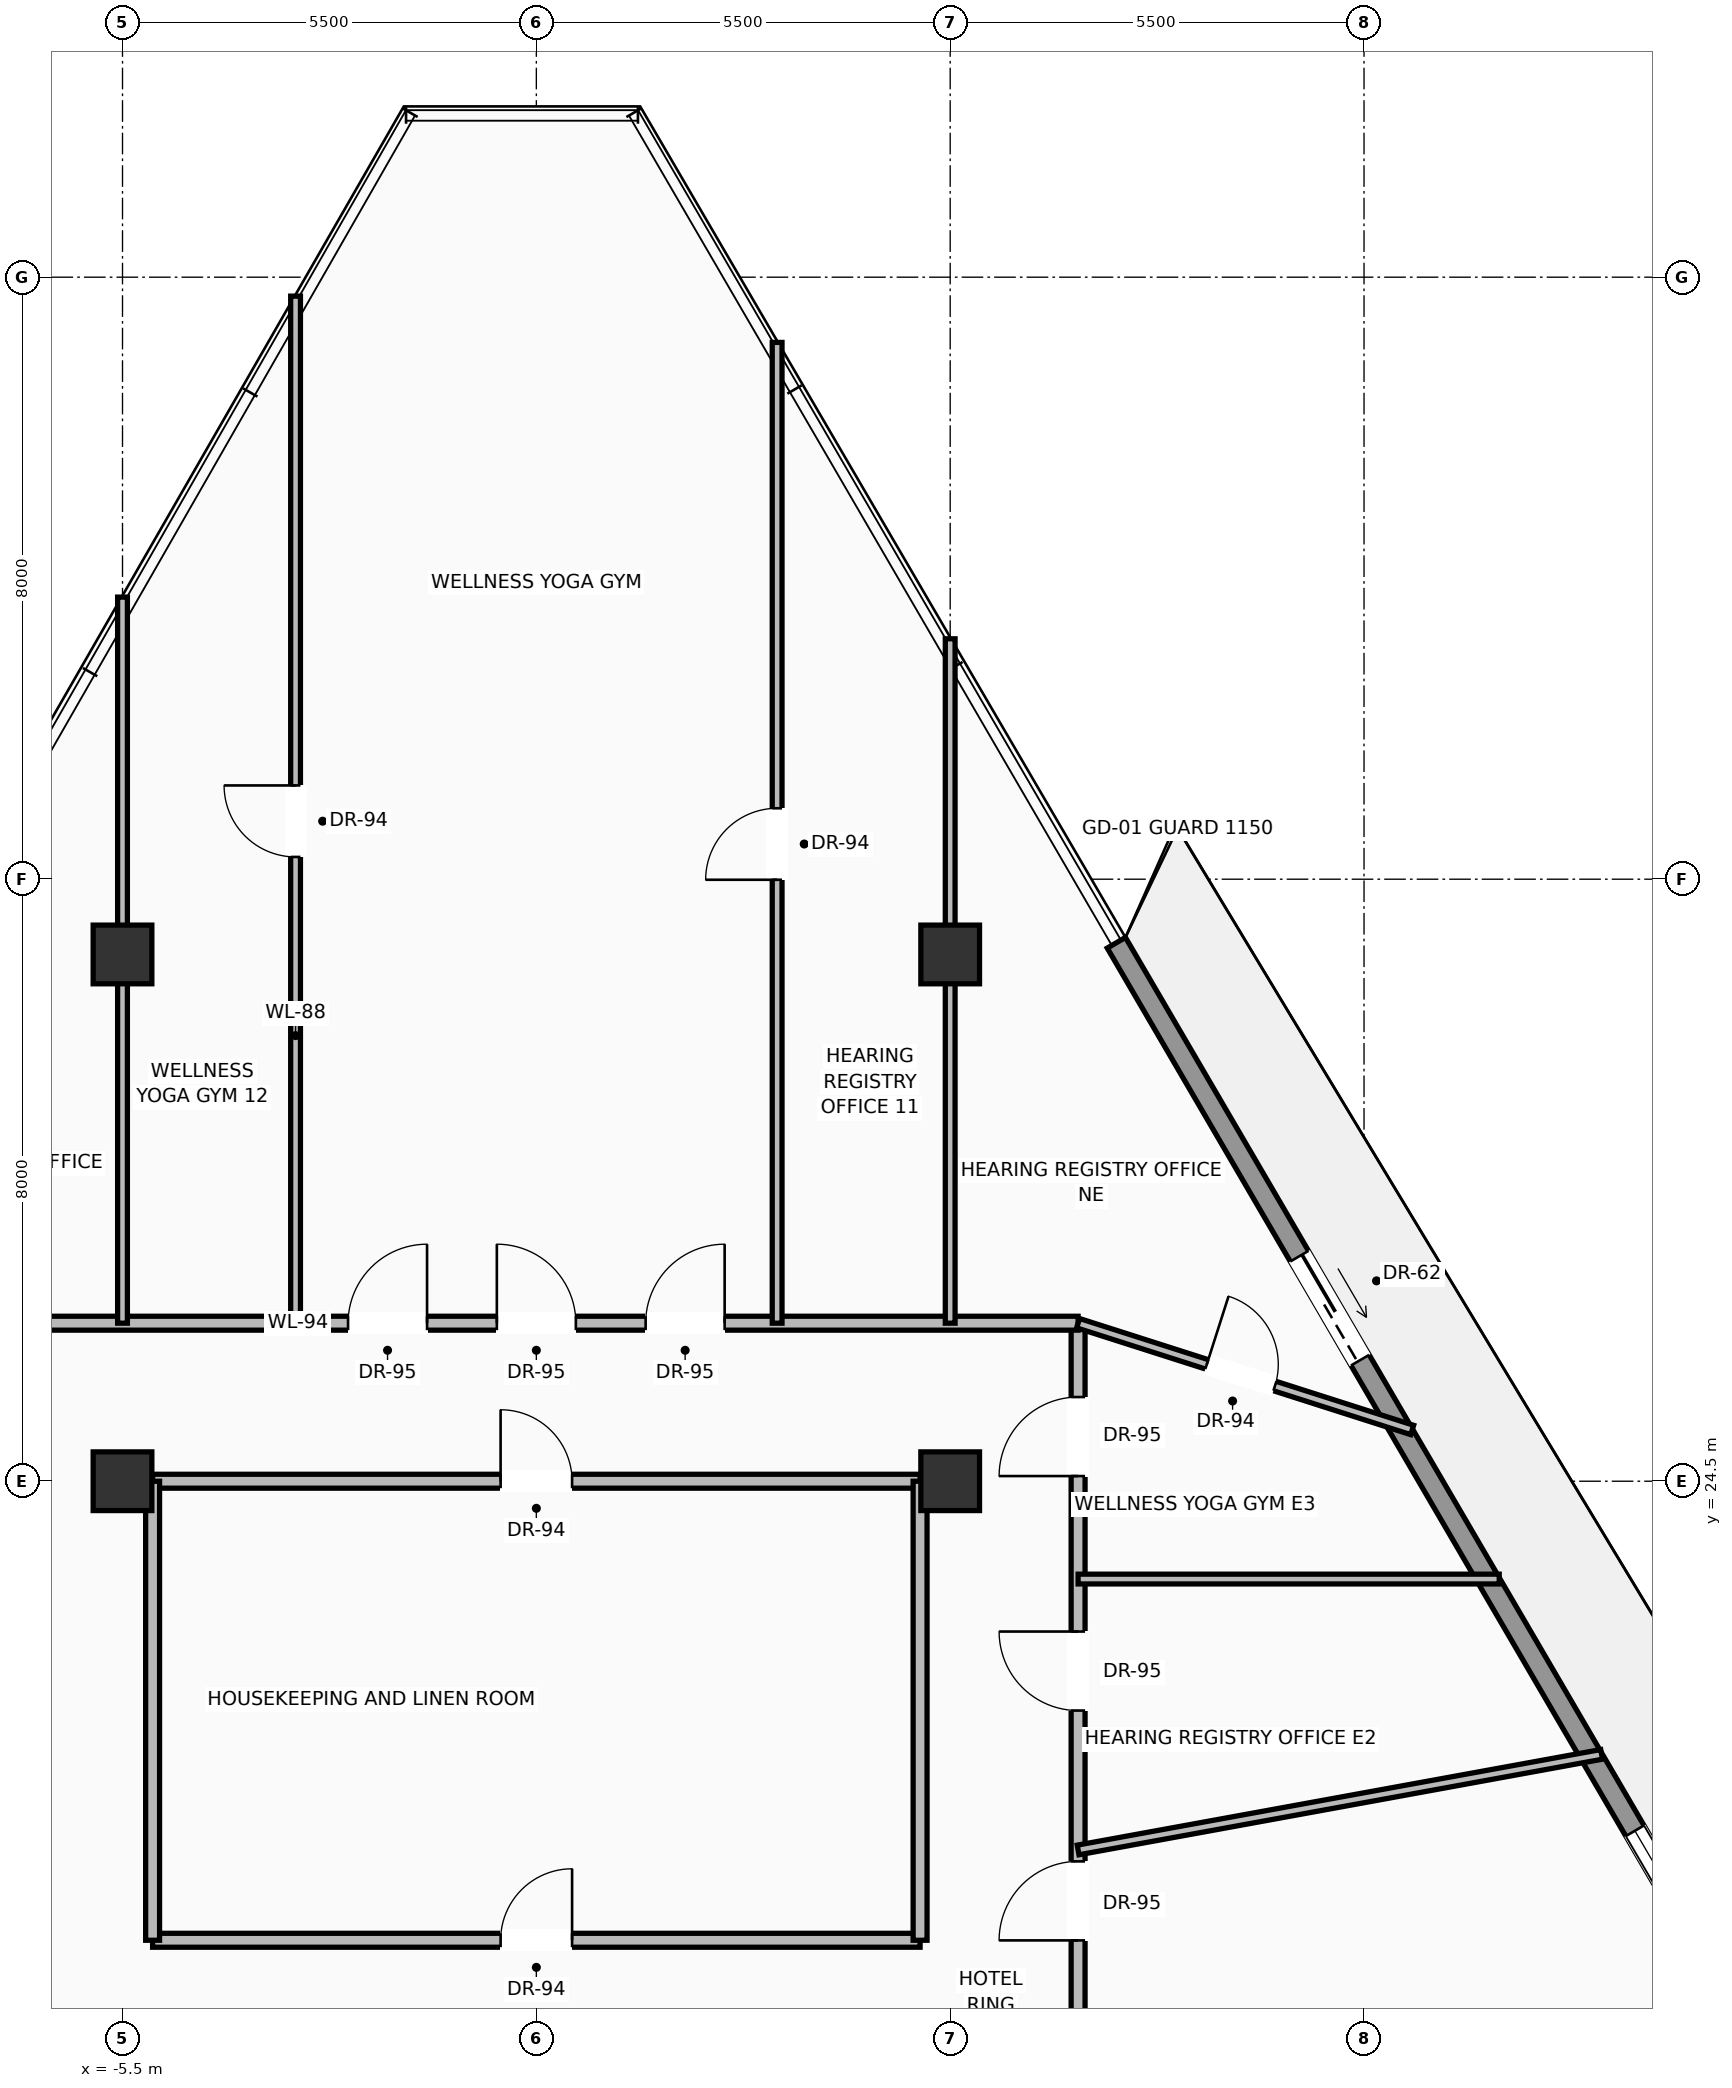
"""IFC4 building model, lengths in metres.
Left out: names, types, materials, properties, quantities, classifications, styles, units other than length and angle.
Written with IfcOpenShell. Run it as: python <this file> out.ifc"""

import sys

from ifc_helpers import new_model, si_unit, direction, frame, frame_2d, origin, origin_2d, place, context, subcontext, project, spatial, rectangle, extrude, source, transform, mapped, element, fill, save


model = new_model("IFC4")
c1 = context("Model", 3, precision=1e-05, world=origin(), true_north=direction((0.0, 1.0)))
c2 = subcontext(c1, "Body", "Model", "MODEL_VIEW")
j1 = project(units=[si_unit("LENGTHUNIT", "METRE"), si_unit("PLANEANGLEUNIT", "RADIAN")], contexts=[c1])
p1 = place(None, origin())
s1 = spatial("IfcSite", under=j1, at=p1, CompositionType="ELEMENT")
p2 = place(p1, origin())
s2 = spatial("IfcBuilding", under=s1, at=p2, CompositionType="ELEMENT")
p3 = place(p2, frame((0.0, 0.0, 286.8)))
s3 = spatial("IfcBuildingStorey", under=s2, at=p3, CompositionType="ELEMENT", Elevation=286.8)
m1 = source(origin(), c2, "Body", "SweptSolid", [
    extrude(rectangle(XDim=0.78, YDim=0.78, at=origin_2d()), origin(), (0.0, 0.0, 1.0), 3.45),
])
for number, where, z_axis, x_axis in (
    (1, (-5.5, 24.5, 0.0), (0.0, 0.0, 1.0), (1.0, 0.0, 0.0)),
    (2, (5.5, 24.5, 0.0), (0.0, 0.0, 1.0), (1.0, 0.0, 0.0)),
    (3, (-5.5, 31.5, 0.0), (0.0, 0.0, 1.0), (1.0, 0.0, 0.0)),
    (4, (5.5, 31.5, 0.0), (0.0, 0.0, 1.0), (1.0, 0.0, 0.0)),
):
    element("IfcColumn", number, at=place(p3, frame(where, z_axis=z_axis, x_axis=x_axis)), inside=s3, PredefinedType="COLUMN", context=c2, shape_type="MappedRepresentation", body=[
        mapped(m1, transform((0.0, 0.0, 0.0), scale=1.0)),
    ])
p4 = place(p3, frame((7.708, 31.656, 0.0), z_axis=(0.0, 0.0, 1.0), x_axis=(0.504292445958, -0.86353293449, 0.0)))
e5 = element("IfcWall", 5, at=p4, inside=s3, PredefinedType="SOLIDWALL", context=c2, shape_type="SweptSolid", body=[
    extrude(rectangle(XDim=20.096, YDim=0.28, at=frame_2d((10.048, 0.0))), origin(), (0.0, 0.0, 1.0), 2.82),
])
p5 = place(p4, frame((4.823, 0.0, 0.0)))
e6 = element("IfcOpeningElement", 6, at=p5, cuts=e5, PredefinedType="OPENING", context=c2, shape_type="SweptSolid", body=[
    extrude(rectangle(XDim=1.6, YDim=2.35, at=frame_2d((0.8, 1.175))), frame((0.0, 0.15, 0.0), z_axis=(0.0, -1.0, 0.0), x_axis=(1.0, 0.0, 0.0)), (0.0, 0.0, 1.0), 0.3),
])
p6 = place(p4, frame((13.666, 0.0, 0.9)))
e7 = element("IfcOpeningElement", 7, at=p6, cuts=e5, PredefinedType="OPENING", context=c2, shape_type="SweptSolid", body=[
    extrude(rectangle(XDim=1.55, YDim=1.75, at=frame_2d((0.775, 0.875))), frame((0.0, 0.15, 0.0), z_axis=(0.0, -1.0, 0.0), x_axis=(1.0, 0.0, 0.0)), (0.0, 0.0, 1.0), 0.3),
])
p7 = place(p3, frame((-5.1, 18.4, 0.0), z_axis=(0.0, 0.0, 1.0), x_axis=(1.0, 0.0, 0.0)))
e8 = element("IfcWall", 8, at=p7, inside=s3, PredefinedType="PARTITIONING", context=c2, shape_type="SweptSolid", body=[
    extrude(rectangle(XDim=10.2, YDim=0.185, at=frame_2d((5.1, 0.0))), origin(), (0.0, 0.0, 1.0), 3.232),
])
p8 = place(p7, frame((4.625, 0.0, 0.0)))
e9 = element("IfcOpeningElement", 9, at=p8, cuts=e8, PredefinedType="OPENING", context=c2, shape_type="SweptSolid", body=[
    extrude(rectangle(XDim=0.95, YDim=2.2, at=frame_2d((0.475, 1.1))), frame((0.0, 0.103, 0.0), z_axis=(0.0, -1.0, 0.0), x_axis=(1.0, 0.0, 0.0)), (0.0, 0.0, 1.0), 0.205),
])
p9 = place(p3, frame((-5.1, 24.5, 0.0), z_axis=(0.0, 0.0, 1.0), x_axis=(1.0, 0.0, 0.0)))
e10 = element("IfcWall", 10, at=p9, inside=s3, PredefinedType="PARTITIONING", context=c2, shape_type="SweptSolid", body=[
    extrude(rectangle(XDim=10.2, YDim=0.185, at=frame_2d((5.1, 0.0))), origin(), (0.0, 0.0, 1.0), 2.683),
])
p10 = place(p9, frame((4.625, 0.0, 0.0)))
e11 = element("IfcOpeningElement", 11, at=p10, cuts=e10, PredefinedType="OPENING", context=c2, shape_type="SweptSolid", body=[
    extrude(rectangle(XDim=0.95, YDim=2.2, at=frame_2d((0.475, 1.1))), frame((0.0, 0.103, 0.0), z_axis=(0.0, -1.0, 0.0), x_axis=(1.0, 0.0, 0.0)), (0.0, 0.0, 1.0), 0.205),
])
for number, where, z_axis, x_axis in (
    (12, (-5.1, 18.4, 0.0), (0.0, 0.0, 1.0), (0.0, 1.0, 0.0)),
    (13, (5.1, 18.4, 0.0), (0.0, 0.0, 1.0), (0.0, 1.0, 0.0)),
):
    element("IfcWall", number, at=place(p3, frame(where, z_axis=z_axis, x_axis=x_axis)), inside=s3, PredefinedType="PARTITIONING", context=c2, shape_type="SweptSolid", body=[
        extrude(rectangle(XDim=6.1, YDim=0.185, at=frame_2d((3.05, 0.0))), origin(), (0.0, 0.0, 1.0), 3.232),
    ])
p11 = place(p3, frame((7.2, 16.2, 0.0), z_axis=(0.0, 0.0, 1.0), x_axis=(0.0, 1.0, 0.0)))
e14 = element("IfcWall", 14, at=p11, inside=s3, PredefinedType="PARTITIONING", context=c2, shape_type="SweptSolid", body=[
    extrude(rectangle(XDim=10.4, YDim=0.185, at=frame_2d((5.2, 0.0))), origin(), (0.0, 0.0, 1.0), 3.232),
])
p12 = place(p11, frame((2.198, 0.0, 0.0)))
e15 = element("IfcOpeningElement", 15, at=p12, cuts=e14, PredefinedType="OPENING", context=c2, shape_type="SweptSolid", body=[
    extrude(rectangle(XDim=1.05, YDim=2.25, at=frame_2d((0.525, 1.125))), frame((0.0, 0.103, 0.0), z_axis=(0.0, -1.0, 0.0), x_axis=(1.0, 0.0, 0.0)), (0.0, 0.0, 1.0), 0.205),
])
p13 = place(p11, frame((5.252, 0.0, 0.0)))
e16 = element("IfcOpeningElement", 16, at=p13, cuts=e14, PredefinedType="OPENING", context=c2, shape_type="SweptSolid", body=[
    extrude(rectangle(XDim=1.05, YDim=2.25, at=frame_2d((0.525, 1.125))), frame((0.0, 0.103, 0.0), z_axis=(0.0, -1.0, 0.0), x_axis=(1.0, 0.0, 0.0)), (0.0, 0.0, 1.0), 0.205),
])
p14 = place(p11, frame((8.369, 0.0, 0.0)))
e17 = element("IfcOpeningElement", 17, at=p14, cuts=e14, PredefinedType="OPENING", context=c2, shape_type="SweptSolid", body=[
    extrude(rectangle(XDim=1.05, YDim=2.25, at=frame_2d((0.525, 1.125))), frame((0.0, 0.103, 0.0), z_axis=(0.0, -1.0, 0.0), x_axis=(1.0, 0.0, 0.0)), (0.0, 0.0, 1.0), 0.205),
])
p15 = place(p3, frame((-7.2, 26.6, 0.0), z_axis=(0.0, 0.0, 1.0), x_axis=(1.0, 0.0, 0.0)))
e18 = element("IfcWall", 18, at=p15, inside=s3, PredefinedType="PARTITIONING", context=c2, shape_type="SweptSolid", body=[
    extrude(rectangle(XDim=14.4, YDim=0.185, at=frame_2d((7.2, 0.0))), origin(), (0.0, 0.0, 1.0), 3.232),
])
p16 = place(p15, frame((4.698, 0.0, 0.0)))
e19 = element("IfcOpeningElement", 19, at=p16, cuts=e18, PredefinedType="OPENING", context=c2, shape_type="SweptSolid", body=[
    extrude(rectangle(XDim=1.05, YDim=2.25, at=frame_2d((0.525, 1.125))), frame((0.0, 0.103, 0.0), z_axis=(0.0, -1.0, 0.0), x_axis=(1.0, 0.0, 0.0)), (0.0, 0.0, 1.0), 0.205),
])
p17 = place(p15, frame((6.675, 0.0, 0.0)))
e20 = element("IfcOpeningElement", 20, at=p17, cuts=e18, PredefinedType="OPENING", context=c2, shape_type="SweptSolid", body=[
    extrude(rectangle(XDim=1.05, YDim=2.25, at=frame_2d((0.525, 1.125))), frame((0.0, 0.103, 0.0), z_axis=(0.0, -1.0, 0.0), x_axis=(1.0, 0.0, 0.0)), (0.0, 0.0, 1.0), 0.205),
])
p18 = place(p15, frame((8.653, 0.0, 0.0)))
e21 = element("IfcOpeningElement", 21, at=p18, cuts=e18, PredefinedType="OPENING", context=c2, shape_type="SweptSolid", body=[
    extrude(rectangle(XDim=1.05, YDim=2.25, at=frame_2d((0.525, 1.125))), frame((0.0, 0.103, 0.0), z_axis=(0.0, -1.0, 0.0), x_axis=(1.0, 0.0, 0.0)), (0.0, 0.0, 1.0), 0.205),
])
p19 = place(p3, frame((7.2, 26.6, 0.0), z_axis=(0.0, 0.0, 1.0), x_axis=(0.952553600786, -0.304370888275, 0.0)))
e22 = element("IfcWall", 22, at=p19, inside=s3, PredefinedType="PARTITIONING", context=c2, shape_type="SweptSolid", body=[
    extrude(rectangle(XDim=4.661, YDim=0.13, at=frame_2d((2.331, 0.0))), origin(), (0.0, 0.0, 1.0), 3.232),
])
p20 = place(p19, frame((1.796, 0.0, 0.0)))
e23 = element("IfcOpeningElement", 23, at=p20, cuts=e22, PredefinedType="OPENING", context=c2, shape_type="SweptSolid", body=[
    extrude(rectangle(XDim=0.95, YDim=2.2, at=frame_2d((0.475, 1.1))), frame((0.0, 0.075, 0.0), z_axis=(0.0, -1.0, 0.0), x_axis=(1.0, 0.0, 0.0)), (0.0, 0.0, 1.0), 0.15),
])
p21 = place(p3, frame((-5.5, 26.6, 0.0), z_axis=(0.0, 0.0, 1.0), x_axis=(0.0, 1.0, 0.0)))
e24 = element("IfcWall", 24, at=p21, inside=s3, PredefinedType="PARTITIONING", context=c2, shape_type="SweptSolid", body=[
    extrude(rectangle(XDim=9.649, YDim=0.13, at=frame_2d((4.824, 0.0))), origin(), (0.0, 0.0, 1.0), 2.683),
])
p22 = place(p3, frame((5.5, 26.6, 0.0), z_axis=(0.0, 0.0, 1.0), x_axis=(0.0, 1.0, 0.0)))
e25 = element("IfcWall", 25, at=p22, inside=s3, PredefinedType="PARTITIONING", context=c2, shape_type="SweptSolid", body=[
    extrude(rectangle(XDim=9.095, YDim=0.13, at=frame_2d((4.547, 0.0))), origin(), (0.0, 0.0, 1.0), 2.683),
])
p23 = place(p3, frame((-3.2, 26.6, 0.0), z_axis=(0.0, 0.0, 1.0), x_axis=(0.0, 1.0, 0.0)))
e26 = element("IfcWall", 26, at=p23, inside=s3, PredefinedType="PARTITIONING", context=c2, shape_type="SweptSolid", body=[
    extrude(rectangle(XDim=13.648, YDim=0.13, at=frame_2d((6.824, 0.0))), origin(), (0.0, 0.0, 1.0), 3.232),
])
p24 = place(p23, frame((6.196, 0.0, 0.0)))
e27 = element("IfcOpeningElement", 27, at=p24, cuts=e26, PredefinedType="OPENING", context=c2, shape_type="SweptSolid", body=[
    extrude(rectangle(XDim=0.95, YDim=2.2, at=frame_2d((0.475, 1.1))), frame((0.0, 0.075, 0.0), z_axis=(0.0, -1.0, 0.0), x_axis=(1.0, 0.0, 0.0)), (0.0, 0.0, 1.0), 0.15),
])
p25 = place(p3, frame((3.2, 26.6, 0.0), z_axis=(0.0, 0.0, 1.0), x_axis=(0.0, 1.0, 0.0)))
e28 = element("IfcWall", 28, at=p25, inside=s3, PredefinedType="PARTITIONING", context=c2, shape_type="SweptSolid", body=[
    extrude(rectangle(XDim=13.033, YDim=0.13, at=frame_2d((6.517, 0.0))), origin(), (0.0, 0.0, 1.0), 3.232),
])
p26 = place(p25, frame((5.893, 0.0, 0.0)))
e29 = element("IfcOpeningElement", 29, at=p26, cuts=e28, PredefinedType="OPENING", context=c2, shape_type="SweptSolid", body=[
    extrude(rectangle(XDim=0.95, YDim=2.2, at=frame_2d((0.475, 1.1))), frame((0.0, 0.075, 0.0), z_axis=(0.0, -1.0, 0.0), x_axis=(1.0, 0.0, 0.0)), (0.0, 0.0, 1.0), 0.15),
])
p27 = place(p3, frame((7.2, 19.6, 0.0), z_axis=(0.0, 0.0, 1.0), x_axis=(0.983744847031, 0.179571924144, 0.0)))
e30 = element("IfcWall", 30, at=p27, inside=s3, PredefinedType="PARTITIONING", context=c2, shape_type="SweptSolid", body=[
    extrude(rectangle(XDim=7.073, YDim=0.13, at=frame_2d((3.536, 0.0))), origin(), (0.0, 0.0, 1.0), 2.885),
])
p28 = place(p3, frame((7.2, 23.2, 0.0), z_axis=(0.0, 0.0, 1.0), x_axis=(1.0, 0.0, 0.0)))
e31 = element("IfcWall", 31, at=p28, inside=s3, PredefinedType="PARTITIONING", context=c2, shape_type="SweptSolid", body=[
    extrude(rectangle(XDim=5.597, YDim=0.13, at=frame_2d((2.798, 0.0))), origin(), (0.0, 0.0, 1.0), 3.232),
])
m2 = source(origin(), c2, "Body", "SweptSolid", [
    extrude(rectangle(XDim=1.6, YDim=2.35, at=frame_2d((0.8, 1.175))), frame((0.0, 0.025, 0.0), z_axis=(0.0, -1.0, 0.0), x_axis=(1.0, 0.0, 0.0)), (0.0, 0.0, 1.0), 0.05),
])
p29 = place(p5, origin())
e32 = element("IfcDoor", 32, at=p29, inside=s3, OperationType="SLIDING_TO_RIGHT", PredefinedType="DOOR", context=c2, shape_type="MappedRepresentation", body=[
    mapped(m2, transform((0.0, 0.0, 0.0), scale=1.0)),
])
fill(e6, e32)
m3 = source(origin(), c2, "Body", "SweptSolid", [
    extrude(rectangle(XDim=1.55, YDim=1.75, at=frame_2d((0.775, 0.875))), frame((0.0, 0.03, 0.0), z_axis=(0.0, -1.0, 0.0), x_axis=(1.0, 0.0, 0.0)), (0.0, 0.0, 1.0), 0.06),
])
p30 = place(p6, origin())
e33 = element("IfcWindow", 33, at=p30, inside=s3, PartitioningType="SINGLE_PANEL", PredefinedType="WINDOW", context=c2, shape_type="MappedRepresentation", body=[
    mapped(m3, transform((0.0, 0.0, 0.0), scale=1.0)),
])
fill(e7, e33)
m4 = source(origin(), c2, "Body", "SweptSolid", [
    extrude(rectangle(XDim=0.95, YDim=2.2, at=frame_2d((0.475, 1.1))), frame((0.0, 0.025, 0.0), z_axis=(0.0, -1.0, 0.0), x_axis=(1.0, 0.0, 0.0)), (0.0, 0.0, 1.0), 0.05),
])
p31 = place(p8, origin())
e34 = element("IfcDoor", 34, at=p31, inside=s3, OperationType="SINGLE_SWING_RIGHT", PredefinedType="DOOR", context=c2, shape_type="MappedRepresentation", body=[
    mapped(m4, transform((0.0, 0.0, 0.0), scale=1.0)),
])
fill(e9, e34)
p32 = place(p10, origin())
e35 = element("IfcDoor", 35, at=p32, inside=s3, OperationType="SINGLE_SWING_LEFT", PredefinedType="DOOR", context=c2, shape_type="MappedRepresentation", body=[
    mapped(m4, transform((0.0, 0.0, 0.0), scale=1.0)),
])
fill(e11, e35)
m5 = source(origin(), c2, "Body", "SweptSolid", [
    extrude(rectangle(XDim=1.05, YDim=2.25, at=frame_2d((0.525, 1.125))), frame((0.0, 0.025, 0.0), z_axis=(0.0, -1.0, 0.0), x_axis=(1.0, 0.0, 0.0)), (0.0, 0.0, 1.0), 0.05),
])
p33 = place(p12, origin())
e36 = element("IfcDoor", 36, at=p33, inside=s3, OperationType="SINGLE_SWING_LEFT", PredefinedType="DOOR", context=c2, shape_type="MappedRepresentation", body=[
    mapped(m5, transform((0.0, 0.0, 0.0), scale=1.0)),
])
fill(e15, e36)
p34 = place(p13, origin())
e37 = element("IfcDoor", 37, at=p34, inside=s3, OperationType="SINGLE_SWING_RIGHT", PredefinedType="DOOR", context=c2, shape_type="MappedRepresentation", body=[
    mapped(m5, transform((0.0, 0.0, 0.0), scale=1.0)),
])
fill(e16, e37)
p35 = place(p14, origin())
e38 = element("IfcDoor", 38, at=p35, inside=s3, OperationType="SINGLE_SWING_LEFT", PredefinedType="DOOR", context=c2, shape_type="MappedRepresentation", body=[
    mapped(m5, transform((0.0, 0.0, 0.0), scale=1.0)),
])
fill(e17, e38)
p36 = place(p16, origin())
e39 = element("IfcDoor", 39, at=p36, inside=s3, OperationType="SINGLE_SWING_RIGHT", PredefinedType="DOOR", context=c2, shape_type="MappedRepresentation", body=[
    mapped(m5, transform((0.0, 0.0, 0.0), scale=1.0)),
])
fill(e19, e39)
p37 = place(p17, origin())
e40 = element("IfcDoor", 40, at=p37, inside=s3, OperationType="SINGLE_SWING_LEFT", PredefinedType="DOOR", context=c2, shape_type="MappedRepresentation", body=[
    mapped(m5, transform((0.0, 0.0, 0.0), scale=1.0)),
])
fill(e20, e40)
p38 = place(p18, origin())
e41 = element("IfcDoor", 41, at=p38, inside=s3, OperationType="SINGLE_SWING_RIGHT", PredefinedType="DOOR", context=c2, shape_type="MappedRepresentation", body=[
    mapped(m5, transform((0.0, 0.0, 0.0), scale=1.0)),
])
fill(e21, e41)
p39 = place(p20, origin())
e42 = element("IfcDoor", 42, at=p39, inside=s3, OperationType="SINGLE_SWING_LEFT", PredefinedType="DOOR", context=c2, shape_type="MappedRepresentation", body=[
    mapped(m4, transform((0.0, 0.0, 0.0), scale=1.0)),
])
fill(e23, e42)
p40 = place(p26, origin())
e43 = element("IfcDoor", 43, at=p40, inside=s3, OperationType="SINGLE_SWING_LEFT", PredefinedType="DOOR", context=c2, shape_type="MappedRepresentation", body=[
    mapped(m4, transform((0.0, 0.0, 0.0), scale=1.0)),
])
fill(e29, e43)
p41 = place(p24, origin())
e44 = element("IfcDoor", 44, at=p41, inside=s3, OperationType="SINGLE_SWING_RIGHT", PredefinedType="DOOR", context=c2, shape_type="MappedRepresentation", body=[
    mapped(m4, transform((0.0, 0.0, 0.0), scale=1.0)),
])
fill(e27, e44)
save(model, sys.argv[1])
